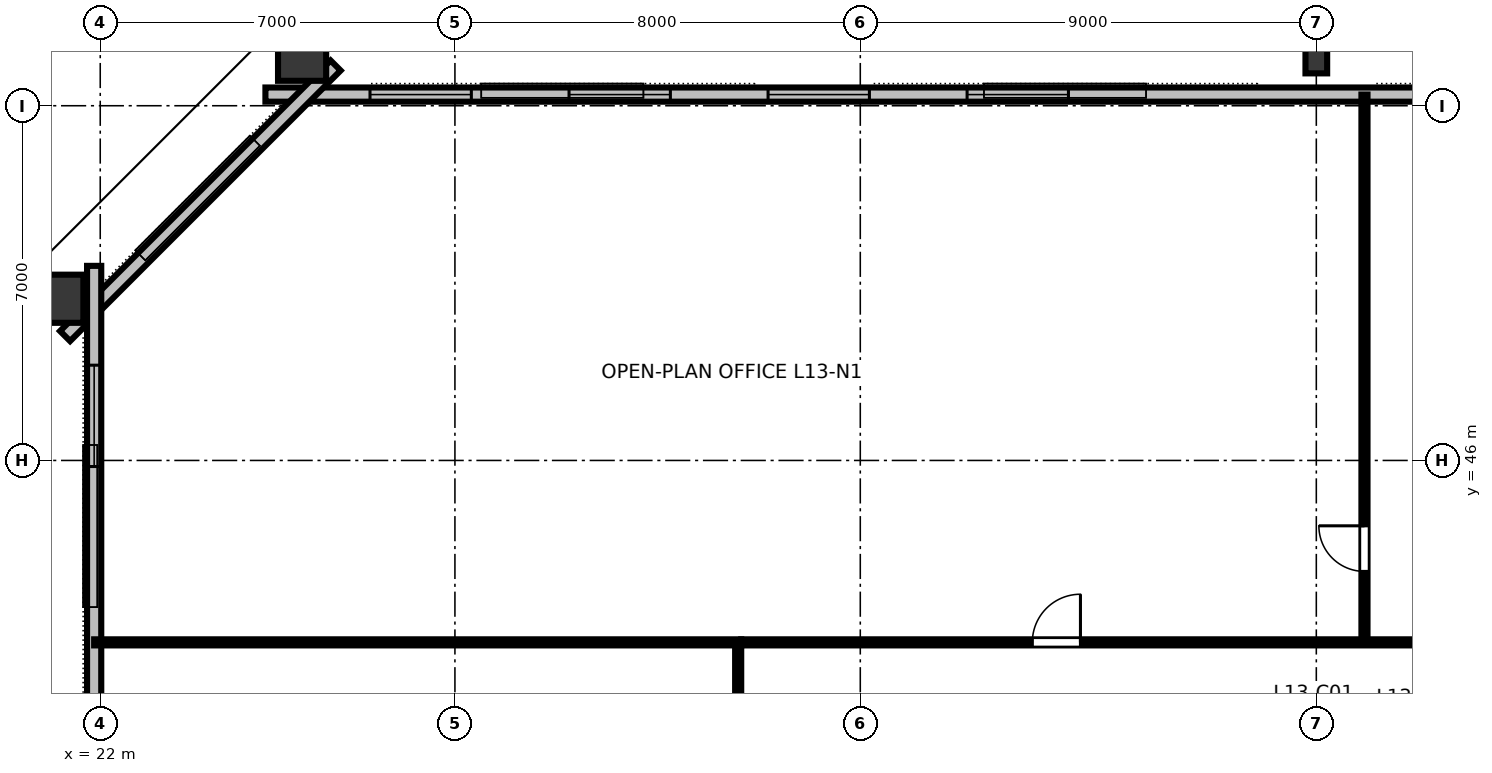
"""IFC4 building model, lengths in metres.
Left out: names, types, materials, properties, quantities, classifications, styles, units other than length and angle.
Written with IfcOpenShell. Run it as: python <this file> out.ifc"""

import sys

from ifc_helpers import new_model, si_unit, direction, frame, frame_2d, origin, origin_2d, place, context, subcontext, project, spatial, rectangle, hollow_rectangle, i_section, extrude, element, fill, save


model = new_model("IFC4")
c1 = context("Model", 3, precision=1e-05, world=origin(), true_north=direction((0.0, 1.0)))
c2 = subcontext(c1, "Body", "Model", "MODEL_VIEW")
j1 = project(units=[si_unit("LENGTHUNIT", "METRE"), si_unit("PLANEANGLEUNIT", "RADIAN")], contexts=[c1])
p1 = place(None, origin())
s1 = spatial("IfcSite", under=j1, at=p1, CompositionType="ELEMENT")
p2 = place(p1, origin())
s2 = spatial("IfcBuilding", under=s1, at=p2, CompositionType="ELEMENT")
p3 = place(p2, frame((0.0, 0.0, 53.2)))
s3 = spatial("IfcBuildingStorey", under=s2, at=p3, CompositionType="ELEMENT", Elevation=53.2)
p4 = place(p3, frame((46.0, 53.88, 0.0), z_axis=(0.0, 0.0, 1.0), x_axis=(1.0, 0.0, 0.0)))
e1 = element("IfcColumn", 1, at=p4, inside=s3, PredefinedType="COLUMN", context=c2, shape_type="SweptSolid", body=[
    extrude(i_section(OverallWidth=0.428, OverallDepth=0.483, WebThickness=0.051, FlangeThickness=0.082, FilletRadius=0.025, at=origin_2d()), origin(), (0.0, 0.0, 1.0), 3.358),
])
for number, where, z_axis, x_axis in (
    (2, (25.984, 54.067, 0.0), (0.0, 0.0, 1.0), (1.0, 0.0, 0.0)),
    (3, (21.093, 49.191, 0.0), (0.0, 0.0, 1.0), (0.0, 1.0, 0.0)),
):
    element("IfcColumn", number, at=place(p3, frame(where, z_axis=z_axis, x_axis=x_axis)), inside=s3, PredefinedType="COLUMN", context=c2, shape_type="SweptSolid", body=[
        extrude(hollow_rectangle(XDim=0.95, YDim=1.15, WallThickness=0.06, at=origin_2d()), origin(), (0.0, 0.0, 1.0), 3.358),
    ])
p5 = place(p3, frame((66.74, 53.22, 0.0), z_axis=(0.0, 0.0, 1.0), x_axis=(-1.0, 0.0, 0.0)))
e4 = element("IfcWall", 4, at=p5, inside=s3, PredefinedType="STANDARD", context=c2, shape_type="SweptSolid", body=[
    extrude(rectangle(XDim=41.48, YDim=0.28, at=frame_2d((20.74, 0.0))), origin(), (0.0, 0.0, 1.0), 3.36),
])
p6 = place(p5, frame((2.064, 0.0, 0.8)))
e5 = element("IfcOpeningElement", 5, at=p6, cuts=e4, PredefinedType="OPENING", context=c2, shape_type="SweptSolid", body=[
    extrude(rectangle(XDim=2.0, YDim=1.95, at=frame_2d((1.0, 0.975))), frame((0.0, 0.15, 0.0), z_axis=(0.0, -1.0, 0.0), x_axis=(1.0, 0.0, 0.0)), (0.0, 0.0, 1.0), 0.3),
])
p7 = place(p5, frame((5.992, 0.0, 0.8)))
e6 = element("IfcOpeningElement", 6, at=p7, cuts=e4, PredefinedType="OPENING", context=c2, shape_type="SweptSolid", body=[
    extrude(rectangle(XDim=2.0, YDim=1.95, at=frame_2d((1.0, 0.975))), frame((0.0, 0.15, 0.0), z_axis=(0.0, -1.0, 0.0), x_axis=(1.0, 0.0, 0.0)), (0.0, 0.0, 1.0), 0.3),
])
p8 = place(p5, frame((9.92, 0.0, 0.8)))
e7 = element("IfcOpeningElement", 7, at=p8, cuts=e4, PredefinedType="OPENING", context=c2, shape_type="SweptSolid", body=[
    extrude(rectangle(XDim=2.0, YDim=1.95, at=frame_2d((1.0, 0.975))), frame((0.0, 0.15, 0.0), z_axis=(0.0, -1.0, 0.0), x_axis=(1.0, 0.0, 0.0)), (0.0, 0.0, 1.0), 0.3),
])
p9 = place(p5, frame((13.848, 0.0, 0.8)))
e8 = element("IfcOpeningElement", 8, at=p9, cuts=e4, PredefinedType="OPENING", context=c2, shape_type="SweptSolid", body=[
    extrude(rectangle(XDim=2.0, YDim=1.95, at=frame_2d((1.0, 0.975))), frame((0.0, 0.15, 0.0), z_axis=(0.0, -1.0, 0.0), x_axis=(1.0, 0.0, 0.0)), (0.0, 0.0, 1.0), 0.3),
])
p10 = place(p5, frame((25.632, 0.0, 0.8)))
e9 = element("IfcOpeningElement", 9, at=p10, cuts=e4, PredefinedType="OPENING", context=c2, shape_type="SweptSolid", body=[
    extrude(rectangle(XDim=2.0, YDim=1.95, at=frame_2d((1.0, 0.975))), frame((0.0, 0.15, 0.0), z_axis=(0.0, -1.0, 0.0), x_axis=(1.0, 0.0, 0.0)), (0.0, 0.0, 1.0), 0.3),
])
p11 = place(p5, frame((29.56, 0.0, 0.8)))
e10 = element("IfcOpeningElement", 10, at=p11, cuts=e4, PredefinedType="OPENING", context=c2, shape_type="SweptSolid", body=[
    extrude(rectangle(XDim=2.0, YDim=1.95, at=frame_2d((1.0, 0.975))), frame((0.0, 0.15, 0.0), z_axis=(0.0, -1.0, 0.0), x_axis=(1.0, 0.0, 0.0)), (0.0, 0.0, 1.0), 0.3),
])
p12 = place(p5, frame((33.488, 0.0, 0.8)))
e11 = element("IfcOpeningElement", 11, at=p12, cuts=e4, PredefinedType="OPENING", context=c2, shape_type="SweptSolid", body=[
    extrude(rectangle(XDim=2.0, YDim=1.95, at=frame_2d((1.0, 0.975))), frame((0.0, 0.15, 0.0), z_axis=(0.0, -1.0, 0.0), x_axis=(1.0, 0.0, 0.0)), (0.0, 0.0, 1.0), 0.3),
])
p13 = place(p5, frame((37.416, 0.0, 0.8)))
e12 = element("IfcOpeningElement", 12, at=p13, cuts=e4, PredefinedType="OPENING", context=c2, shape_type="SweptSolid", body=[
    extrude(rectangle(XDim=2.0, YDim=1.95, at=frame_2d((1.0, 0.975))), frame((0.0, 0.15, 0.0), z_axis=(0.0, -1.0, 0.0), x_axis=(1.0, 0.0, 0.0)), (0.0, 0.0, 1.0), 0.3),
])
p14 = place(p3, frame((26.646, 53.794, 0.0), z_axis=(0.0, 0.0, 1.0), x_axis=(-0.707106781187, -0.707106781187, 0.0)))
e13 = element("IfcWall", 13, at=p14, inside=s3, PredefinedType="STANDARD", context=c2, shape_type="SweptSolid", body=[
    extrude(rectangle(XDim=7.551, YDim=0.28, at=frame_2d((3.775, 0.0))), origin(), (0.0, 0.0, 1.0), 3.36),
])
p15 = place(p3, frame((21.88, 49.84, 0.0), z_axis=(0.0, 0.0, 1.0), x_axis=(0.0, -1.0, 0.0)))
e14 = element("IfcWall", 14, at=p15, inside=s3, PredefinedType="STANDARD", context=c2, shape_type="SweptSolid", body=[
    extrude(rectangle(XDim=35.68, YDim=0.28, at=frame_2d((17.84, 0.0))), origin(), (0.0, 0.0, 1.0), 3.36),
])
p16 = place(p15, frame((1.96, 0.0, 0.8)))
e15 = element("IfcOpeningElement", 15, at=p16, cuts=e14, PredefinedType="OPENING", context=c2, shape_type="SweptSolid", body=[
    extrude(rectangle(XDim=2.0, YDim=1.95, at=frame_2d((1.0, 0.975))), frame((0.0, 0.15, 0.0), z_axis=(0.0, -1.0, 0.0), x_axis=(1.0, 0.0, 0.0)), (0.0, 0.0, 1.0), 0.3),
])
p17 = place(p15, frame((9.4, 0.0, 0.8)))
e16 = element("IfcOpeningElement", 16, at=p17, cuts=e14, PredefinedType="OPENING", context=c2, shape_type="SweptSolid", body=[
    extrude(rectangle(XDim=2.0, YDim=1.95, at=frame_2d((1.0, 0.975))), frame((0.0, 0.15, 0.0), z_axis=(0.0, -1.0, 0.0), x_axis=(1.0, 0.0, 0.0)), (0.0, 0.0, 1.0), 0.3),
])
p18 = place(p15, frame((13.12, 0.0, 0.8)))
e17 = element("IfcOpeningElement", 17, at=p18, cuts=e14, PredefinedType="OPENING", context=c2, shape_type="SweptSolid", body=[
    extrude(rectangle(XDim=2.0, YDim=1.95, at=frame_2d((1.0, 0.975))), frame((0.0, 0.15, 0.0), z_axis=(0.0, -1.0, 0.0), x_axis=(1.0, 0.0, 0.0)), (0.0, 0.0, 1.0), 0.3),
])
p19 = place(p15, frame((20.56, 0.0, 0.8)))
e18 = element("IfcOpeningElement", 18, at=p19, cuts=e14, PredefinedType="OPENING", context=c2, shape_type="SweptSolid", body=[
    extrude(rectangle(XDim=2.0, YDim=1.95, at=frame_2d((1.0, 0.975))), frame((0.0, 0.15, 0.0), z_axis=(0.0, -1.0, 0.0), x_axis=(1.0, 0.0, 0.0)), (0.0, 0.0, 1.0), 0.3),
])
p20 = place(p15, frame((24.28, 0.0, 0.8)))
e19 = element("IfcOpeningElement", 19, at=p20, cuts=e14, PredefinedType="OPENING", context=c2, shape_type="SweptSolid", body=[
    extrude(rectangle(XDim=2.0, YDim=1.95, at=frame_2d((1.0, 0.975))), frame((0.0, 0.15, 0.0), z_axis=(0.0, -1.0, 0.0), x_axis=(1.0, 0.0, 0.0)), (0.0, 0.0, 1.0), 0.3),
])
p21 = place(p15, frame((31.72, 0.0, 0.8)))
e20 = element("IfcOpeningElement", 20, at=p21, cuts=e14, PredefinedType="OPENING", context=c2, shape_type="SweptSolid", body=[
    extrude(rectangle(XDim=2.0, YDim=1.95, at=frame_2d((1.0, 0.975))), frame((0.0, 0.15, 0.0), z_axis=(0.0, -1.0, 0.0), x_axis=(1.0, 0.0, 0.0)), (0.0, 0.0, 1.0), 0.3),
])
p22 = place(p3, frame((46.95, 42.41, 0.0), z_axis=(0.0, 0.0, 1.0), x_axis=(0.0, 1.0, 0.0)))
e21 = element("IfcWall", 21, at=p22, inside=s3, PredefinedType="PARTITIONING", context=c2, shape_type="SweptSolid", body=[
    extrude(rectangle(XDim=10.81, YDim=0.12, at=frame_2d((5.405, 0.0))), origin(), (0.0, 0.0, 1.0), 2.64),
])
p23 = place(p22, frame((1.4, 0.0, 0.0)))
e22 = element("IfcOpeningElement", 22, at=p23, cuts=e21, PredefinedType="OPENING", context=c2, shape_type="SweptSolid", body=[
    extrude(rectangle(XDim=0.9, YDim=2.15, at=frame_2d((0.45, 1.075))), frame((0.0, 0.07, 0.0), z_axis=(0.0, -1.0, 0.0), x_axis=(1.0, 0.0, 0.0)), (0.0, 0.0, 1.0), 0.14),
])
p24 = place(p3, frame((34.65, 42.41, 0.0), z_axis=(0.0, 0.0, 1.0), x_axis=(1.0, 0.0, 0.0)))
e23 = element("IfcWall", 23, at=p24, inside=s3, PredefinedType="PARTITIONING", context=c2, shape_type="SweptSolid", body=[
    extrude(rectangle(XDim=22.7, YDim=0.12, at=frame_2d((11.35, 0.0))), origin(), (0.0, 0.0, 1.0), 2.64),
])
p25 = place(p24, frame((5.745, 0.0, 0.0)))
e24 = element("IfcOpeningElement", 24, at=p25, cuts=e23, PredefinedType="OPENING", context=c2, shape_type="SweptSolid", body=[
    extrude(rectangle(XDim=0.95, YDim=2.15, at=frame_2d((0.475, 1.075))), frame((0.0, 0.07, 0.0), z_axis=(0.0, -1.0, 0.0), x_axis=(1.0, 0.0, 0.0)), (0.0, 0.0, 1.0), 0.14),
])
p26 = place(p24, frame((16.955, 0.0, 0.0)))
e25 = element("IfcOpeningElement", 25, at=p26, cuts=e23, PredefinedType="OPENING", context=c2, shape_type="SweptSolid", body=[
    extrude(rectangle(XDim=0.95, YDim=2.15, at=frame_2d((0.475, 1.075))), frame((0.0, 0.07, 0.0), z_axis=(0.0, -1.0, 0.0), x_axis=(1.0, 0.0, 0.0)), (0.0, 0.0, 1.0), 0.14),
])
p27 = place(p3, frame((34.59, 21.65, 0.0), z_axis=(0.0, 0.0, 1.0), x_axis=(0.0, 1.0, 0.0)))
e26 = element("IfcWall", 26, at=p27, inside=s3, PredefinedType="PARTITIONING", context=c2, shape_type="SweptSolid", body=[
    extrude(rectangle(XDim=20.7, YDim=0.12, at=frame_2d((10.35, 0.0))), origin(), (0.0, 0.0, 1.0), 2.64),
])
p28 = place(p27, frame((9.875, 0.0, 0.0)))
e27 = element("IfcOpeningElement", 27, at=p28, cuts=e26, PredefinedType="OPENING", context=c2, shape_type="SweptSolid", body=[
    extrude(rectangle(XDim=0.95, YDim=2.15, at=frame_2d((0.475, 1.075))), frame((0.0, 0.07, 0.0), z_axis=(0.0, -1.0, 0.0), x_axis=(1.0, 0.0, 0.0)), (0.0, 0.0, 1.0), 0.14),
])
p29 = place(p3, frame((34.65, 42.41, 0.0), z_axis=(0.0, 0.0, 1.0), x_axis=(-1.0, 0.0, 0.0)))
e28 = element("IfcWall", 28, at=p29, inside=s3, PredefinedType="PARTITIONING", context=c2, shape_type="SweptSolid", body=[
    extrude(rectangle(XDim=12.77, YDim=0.12, at=frame_2d((6.385, 0.0))), origin(), (0.0, 0.0, 1.0), 2.64),
])
p30 = place(p10, origin())
e29 = element("IfcWindow", 29, at=p30, inside=s3, PartitioningType="SINGLE_PANEL", PredefinedType="WINDOW", context=c2, shape_type="SweptSolid", body=[
    extrude(rectangle(XDim=2.0, YDim=1.95, at=frame_2d((1.0, 0.975))), frame((0.0, 0.03, 0.0), z_axis=(0.0, -1.0, 0.0), x_axis=(1.0, 0.0, 0.0)), (0.0, 0.0, 1.0), 0.06),
])
fill(e9, e29)
p31 = place(p11, origin())
e30 = element("IfcWindow", 30, at=p31, inside=s3, PartitioningType="SINGLE_PANEL", PredefinedType="WINDOW", context=c2, shape_type="SweptSolid", body=[
    extrude(rectangle(XDim=2.0, YDim=1.95, at=frame_2d((1.0, 0.975))), frame((0.0, 0.03, 0.0), z_axis=(0.0, -1.0, 0.0), x_axis=(1.0, 0.0, 0.0)), (0.0, 0.0, 1.0), 0.06),
])
fill(e10, e30)
p32 = place(p12, origin())
e31 = element("IfcWindow", 31, at=p32, inside=s3, PartitioningType="SINGLE_PANEL", PredefinedType="WINDOW", context=c2, shape_type="SweptSolid", body=[
    extrude(rectangle(XDim=2.0, YDim=1.95, at=frame_2d((1.0, 0.975))), frame((0.0, 0.03, 0.0), z_axis=(0.0, -1.0, 0.0), x_axis=(1.0, 0.0, 0.0)), (0.0, 0.0, 1.0), 0.06),
])
fill(e11, e31)
p33 = place(p13, origin())
e32 = element("IfcWindow", 32, at=p33, inside=s3, PartitioningType="SINGLE_PANEL", PredefinedType="WINDOW", context=c2, shape_type="SweptSolid", body=[
    extrude(rectangle(XDim=2.0, YDim=1.95, at=frame_2d((1.0, 0.975))), frame((0.0, 0.03, 0.0), z_axis=(0.0, -1.0, 0.0), x_axis=(1.0, 0.0, 0.0)), (0.0, 0.0, 1.0), 0.06),
])
fill(e12, e32)
p34 = place(p16, origin())
e33 = element("IfcWindow", 33, at=p34, inside=s3, PartitioningType="SINGLE_PANEL", PredefinedType="WINDOW", context=c2, shape_type="SweptSolid", body=[
    extrude(rectangle(XDim=2.0, YDim=1.95, at=frame_2d((1.0, 0.975))), frame((0.0, 0.03, 0.0), z_axis=(0.0, -1.0, 0.0), x_axis=(1.0, 0.0, 0.0)), (0.0, 0.0, 1.0), 0.06),
])
fill(e15, e33)
p35 = place(p23, origin())
e34 = element("IfcDoor", 34, at=p35, inside=s3, OperationType="SINGLE_SWING_RIGHT", PredefinedType="DOOR", context=c2, shape_type="SweptSolid", body=[
    extrude(rectangle(XDim=0.9, YDim=2.15, at=frame_2d((0.45, 1.075))), frame((0.0, 0.025, 0.0), z_axis=(0.0, -1.0, 0.0), x_axis=(1.0, 0.0, 0.0)), (0.0, 0.0, 1.0), 0.05),
])
fill(e22, e34)
p36 = place(p25, origin())
e35 = element("IfcDoor", 35, at=p36, inside=s3, OperationType="SINGLE_SWING_RIGHT", PredefinedType="DOOR", context=c2, shape_type="SweptSolid", body=[
    extrude(rectangle(XDim=0.95, YDim=2.15, at=frame_2d((0.475, 1.075))), frame((0.0, 0.025, 0.0), z_axis=(0.0, -1.0, 0.0), x_axis=(1.0, 0.0, 0.0)), (0.0, 0.0, 1.0), 0.05),
])
fill(e24, e35)
save(model, sys.argv[1])
